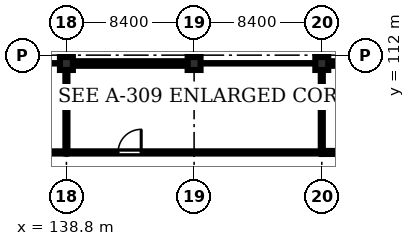
"""IFC4 building model, lengths in metres.
Left out: names, types, materials, properties, quantities, classifications, styles, units other than length and angle.
Written with IfcOpenShell. Run it as: python <this file> out.ifc"""

import sys

from ifc_helpers import new_model, si_unit, direction, frame, frame_2d, origin, origin_2d, place, context, subcontext, project, spatial, rectangle, extrude, element, fill, save


model = new_model("IFC4")
c1 = context("Model", 3, precision=1e-05, world=origin(), true_north=direction((0.0, 1.0)))
c2 = subcontext(c1, "Body", "Model", "MODEL_VIEW")
j1 = project(units=[si_unit("LENGTHUNIT", "METRE"), si_unit("PLANEANGLEUNIT", "RADIAN")], contexts=[c1])
p1 = place(None, origin())
s1 = spatial("IfcSite", under=j1, at=p1, CompositionType="ELEMENT")
p2 = place(p1, origin())
s2 = spatial("IfcBuilding", under=s1, at=p2, CompositionType="ELEMENT")
p3 = place(p2, frame((0.0, 0.0, 27.6)))
s3 = spatial("IfcBuildingStorey", under=s2, at=p3, CompositionType="ELEMENT", Elevation=27.6)
for number, where, z_axis, x_axis in (
    (1, (138.8, 111.45, 0.0), (0.0, 0.0, 1.0), (1.0, 0.0, 0.0)),
    (2, (147.2, 111.45, 0.0), (0.0, 0.0, 1.0), (1.0, 0.0, 0.0)),
    (3, (155.6, 111.45, 0.0), (0.0, 0.0, 1.0), (1.0, 0.0, 0.0)),
):
    element("IfcColumn", number, at=place(p3, frame(where, z_axis=z_axis, x_axis=x_axis)), inside=s3, PredefinedType="COLUMN", context=c2, shape_type="SweptSolid", body=[
        extrude(rectangle(XDim=0.85, YDim=0.85, at=origin_2d()), origin(), (0.0, 0.0, 1.0), 4.02),
    ])
p4 = place(p3, frame((139.225, 111.45, 0.0), z_axis=(0.0, 0.0, 1.0), x_axis=(1.0, 0.0, 0.0)))
e4 = element("IfcWall", 4, at=p4, inside=s3, PredefinedType="STANDARD", context=c2, shape_type="SweptSolid", body=[
    extrude(rectangle(XDim=7.55, YDim=0.3, at=frame_2d((3.775, 0.0))), origin(), (0.0, 0.0, 1.0), 3.32),
])
p5 = place(p4, frame((0.85, 0.0, 0.9)))
e5 = element("IfcOpeningElement", 5, at=p5, cuts=e4, PredefinedType="OPENING", context=c2, shape_type="SweptSolid", body=[
    extrude(rectangle(XDim=1.8, YDim=2.1, at=frame_2d((0.9, 1.05))), frame((0.0, 0.16, 0.0), z_axis=(0.0, -1.0, 0.0), x_axis=(1.0, 0.0, 0.0)), (0.0, 0.0, 1.0), 0.32),
])
p6 = place(p4, frame((4.65, 0.0, 0.9)))
e6 = element("IfcOpeningElement", 6, at=p6, cuts=e4, PredefinedType="OPENING", context=c2, shape_type="SweptSolid", body=[
    extrude(rectangle(XDim=1.8, YDim=2.1, at=frame_2d((0.9, 1.05))), frame((0.0, 0.16, 0.0), z_axis=(0.0, -1.0, 0.0), x_axis=(1.0, 0.0, 0.0)), (0.0, 0.0, 1.0), 0.32),
])
p7 = place(p3, frame((156.025, 111.45, 0.0), z_axis=(0.0, 0.0, 1.0), x_axis=(1.0, 0.0, 0.0)))
e7 = element("IfcWall", 7, at=p7, inside=s3, PredefinedType="STANDARD", context=c2, shape_type="SweptSolid", body=[
    extrude(rectangle(XDim=7.0, YDim=0.3, at=frame_2d((3.5, 0.0))), origin(), (0.0, 0.0, 1.0), 3.32),
])
p8 = place(p7, frame((0.85, 0.0, 0.9)))
e8 = element("IfcOpeningElement", 8, at=p8, cuts=e7, PredefinedType="OPENING", context=c2, shape_type="SweptSolid", body=[
    extrude(rectangle(XDim=1.8, YDim=2.1, at=frame_2d((0.9, 1.05))), frame((0.0, 0.16, 0.0), z_axis=(0.0, -1.0, 0.0), x_axis=(1.0, 0.0, 0.0)), (0.0, 0.0, 1.0), 0.32),
])
p9 = place(p7, frame((4.65, 0.0, 0.9)))
e9 = element("IfcOpeningElement", 9, at=p9, cuts=e7, PredefinedType="OPENING", context=c2, shape_type="SweptSolid", body=[
    extrude(rectangle(XDim=1.8, YDim=2.1, at=frame_2d((0.9, 1.05))), frame((0.0, 0.16, 0.0), z_axis=(0.0, -1.0, 0.0), x_axis=(1.0, 0.0, 0.0)), (0.0, 0.0, 1.0), 0.32),
])
p10 = place(p3, frame((122.15, 105.6, 0.0), z_axis=(0.0, 0.0, 1.0), x_axis=(1.0, 0.0, 0.0)))
e10 = element("IfcWall", 10, at=p10, inside=s3, PredefinedType="PARTITIONING", context=c2, shape_type="SweptSolid", body=[
    extrude(rectangle(XDim=16.65, YDim=0.145, at=frame_2d((8.325, 0.0))), origin(), (0.0, 0.0, 1.0), 4.02),
])
p11 = place(p10, frame((3.75, 0.0, 0.0)))
e11 = element("IfcOpeningElement", 11, at=p11, cuts=e10, PredefinedType="OPENING", context=c2, shape_type="SweptSolid", body=[
    extrude(rectangle(XDim=1.52, YDim=2.22, at=frame_2d((0.76, 1.11))), frame((0.0, 0.083, 0.0), z_axis=(0.0, -1.0, 0.0), x_axis=(1.0, 0.0, 0.0)), (0.0, 0.0, 1.0), 0.165),
])
p12 = place(p3, frame((138.8, 105.6, 0.0), z_axis=(0.0, 0.0, 1.0), x_axis=(1.0, 0.0, 0.0)))
e12 = element("IfcWall", 12, at=p12, inside=s3, PredefinedType="PARTITIONING", context=c2, shape_type="SweptSolid", body=[
    extrude(rectangle(XDim=16.8, YDim=0.145, at=frame_2d((8.4, 0.0))), origin(), (0.0, 0.0, 1.0), 4.02),
])
p13 = place(p12, frame((3.4, 0.0, 0.0)))
e13 = element("IfcOpeningElement", 13, at=p13, cuts=e12, PredefinedType="OPENING", context=c2, shape_type="SweptSolid", body=[
    extrude(rectangle(XDim=1.52, YDim=2.22, at=frame_2d((0.76, 1.11))), frame((0.0, 0.083, 0.0), z_axis=(0.0, -1.0, 0.0), x_axis=(1.0, 0.0, 0.0)), (0.0, 0.0, 1.0), 0.165),
])
p14 = place(p3, frame((138.8, 105.6, 0.0), z_axis=(0.0, 0.0, 1.0), x_axis=(0.0, 1.0, 0.0)))
e14 = element("IfcWall", 14, at=p14, inside=s3, PredefinedType="PARTITIONING", context=c2, shape_type="SweptSolid", body=[
    extrude(rectangle(XDim=5.75, YDim=0.135, at=frame_2d((2.875, 0.0))), origin(), (0.0, 0.0, 1.0), 3.32),
])
p15 = place(p3, frame((155.6, 105.6, 0.0), z_axis=(0.0, 0.0, 1.0), x_axis=(1.0, 0.0, 0.0)))
e15 = element("IfcWall", 15, at=p15, inside=s3, PredefinedType="SOLIDWALL", context=c2, shape_type="SweptSolid", body=[
    extrude(rectangle(XDim=7.75, YDim=0.2, at=frame_2d((3.875, 0.0))), origin(), (0.0, 0.0, 1.0), 4.02),
])
p16 = place(p15, frame((3.4, 0.0, 0.0)))
e16 = element("IfcOpeningElement", 16, at=p16, cuts=e15, PredefinedType="OPENING", context=c2, shape_type="SweptSolid", body=[
    extrude(rectangle(XDim=1.05, YDim=2.15, at=frame_2d((0.525, 1.075))), frame((0.0, 0.11, 0.0), z_axis=(0.0, -1.0, 0.0), x_axis=(1.0, 0.0, 0.0)), (0.0, 0.0, 1.0), 0.22),
])
p17 = place(p3, frame((155.6, 105.6, 0.0), z_axis=(0.0, 0.0, 1.0), x_axis=(0.0, 1.0, 0.0)))
e17 = element("IfcWall", 17, at=p17, inside=s3, PredefinedType="PARTITIONING", context=c2, shape_type="SweptSolid", body=[
    extrude(rectangle(XDim=5.75, YDim=0.135, at=frame_2d((2.875, 0.0))), origin(), (0.0, 0.0, 1.0), 3.32),
])
p18 = place(p5, origin())
e18 = element("IfcWindow", 18, at=p18, inside=s3, PartitioningType="DOUBLE_PANEL_VERTICAL", PredefinedType="WINDOW", context=c2, shape_type="SweptSolid", body=[
    extrude(rectangle(XDim=1.8, YDim=2.1, at=frame_2d((0.9, 1.05))), frame((0.0, 0.03, 0.0), z_axis=(0.0, -1.0, 0.0), x_axis=(1.0, 0.0, 0.0)), (0.0, 0.0, 1.0), 0.06),
])
fill(e5, e18)
p19 = place(p6, origin())
e19 = element("IfcWindow", 19, at=p19, inside=s3, PartitioningType="DOUBLE_PANEL_VERTICAL", PredefinedType="WINDOW", context=c2, shape_type="SweptSolid", body=[
    extrude(rectangle(XDim=1.8, YDim=2.1, at=frame_2d((0.9, 1.05))), frame((0.0, 0.03, 0.0), z_axis=(0.0, -1.0, 0.0), x_axis=(1.0, 0.0, 0.0)), (0.0, 0.0, 1.0), 0.06),
])
fill(e6, e19)
p20 = place(p13, origin())
e20 = element("IfcDoor", 20, at=p20, inside=s3, OperationType="SINGLE_SWING_RIGHT", PredefinedType="DOOR", context=c2, shape_type="SweptSolid", body=[
    extrude(rectangle(XDim=1.52, YDim=2.22, at=frame_2d((0.76, 1.11))), frame((0.0, 0.025, 0.0), z_axis=(0.0, -1.0, 0.0), x_axis=(1.0, 0.0, 0.0)), (0.0, 0.0, 1.0), 0.05),
])
fill(e13, e20)
save(model, sys.argv[1])
